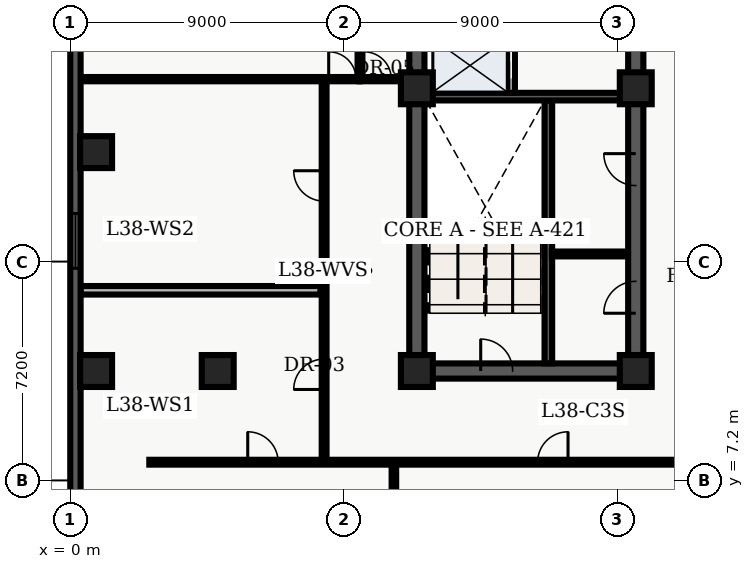
"""IFC4 building model, lengths in metres.
Left out: names, types, materials, properties, quantities, classifications, styles, units other than length and angle.
Written with IfcOpenShell. Run it as: python <this file> out.ifc"""

import sys

from ifc_helpers import new_model, entity, si_unit, converted_unit, direction, frame, origin_with_axes, origin_2d_with_axis, place, context, subcontext, project, spatial, polyline, rectangle, outline, extrude, element, fill, save


model = new_model("IFC4")
c1 = context("Model", 3, precision=1e-05, world=origin_with_axes(), true_north=direction((0.0, 1.0)))
c2 = subcontext(c1, "Body", "Model", "MODEL_VIEW")
j1 = project(units=[si_unit("LENGTHUNIT", "METRE"), converted_unit("PLANEANGLEUNIT", "DEGREE", entity("IfcPlaneAngleMeasure", 0.017), si_unit("PLANEANGLEUNIT", "RADIAN"), dimensions=[0, 0, 0, 0, 0, 0, 0])], contexts=[c1])
p1 = place(None, origin_with_axes())
s1 = spatial("IfcSite", under=j1, at=p1, CompositionType="ELEMENT")
p2 = place(p1, origin_with_axes())
s2 = spatial("IfcBuilding", under=s1, at=p2, CompositionType="ELEMENT")
p3 = place(p2, frame((0.0, 0.0, 156.3), z_axis=(0.0, 0.0, 1.0), x_axis=(1.0, 0.0, 0.0)))
s3 = spatial("IfcBuildingStorey", under=s2, at=p3, CompositionType="ELEMENT", Elevation=156.3)
p4 = place(p3, frame((11.4, 10.8, 0.0), z_axis=(0.0, 0.0, 1.0), x_axis=(0.0, 1.0, 0.0)))
e1 = element("IfcWall", 1, at=p4, inside=s3, PredefinedType="SHEAR", context=c2, shape_type="SweptSolid", body=[
    extrude(outline(polyline([(0.0, -0.25), (27.0, -0.25), (27.0, 0.25), (0.0, 0.25), (0.0, -0.25)])), origin_with_axes(), (0.0, 0.0, 1.0), 3.66),
])
p5 = place(p3, frame((11.4, 10.8, 0.0), z_axis=(0.0, 0.0, 1.0), x_axis=(1.0, 0.0, 0.0)))
e2 = element("IfcWall", 2, at=p5, inside=s3, PredefinedType="SHEAR", context=c2, shape_type="SweptSolid", body=[
    extrude(outline(polyline([(0.0, -0.25), (7.2, -0.25), (7.2, 0.25), (0.0, 0.25), (0.0, -0.25)])), origin_with_axes(), (0.0, 0.0, 1.0), 3.66),
])
p6 = place(p5, frame((2.625, 0.0, 0.0), z_axis=(0.0, 0.0, 1.0), x_axis=(1.0, 0.0, 0.0)))
e3 = element("IfcOpeningElement", 3, at=p6, cuts=e2, PredefinedType="OPENING", context=c2, shape_type="SweptSolid", body=[
    extrude(rectangle(XDim=1.05, YDim=0.52, at=origin_2d_with_axis()), origin_with_axes(), (0.0, 0.0, 1.0), 2.15),
])
p7 = place(p3, frame((18.6, 10.8, 0.0), z_axis=(0.0, 0.0, 1.0), x_axis=(0.0, 1.0, 0.0)))
e4 = element("IfcWall", 4, at=p7, inside=s3, PredefinedType="SHEAR", context=c2, shape_type="SweptSolid", body=[
    extrude(outline(polyline([(0.0, -0.25), (13.5, -0.25), (13.5, 0.25), (0.0, 0.25), (0.0, -0.25)])), origin_with_axes(), (0.0, 0.0, 1.0), 3.66),
])
p8 = place(p7, frame((11.125, 0.0, 0.0), z_axis=(0.0, 0.0, 1.0), x_axis=(1.0, 0.0, 0.0)))
e5 = element("IfcOpeningElement", 5, at=p8, cuts=e4, PredefinedType="OPENING", context=c2, shape_type="SweptSolid", body=[
    extrude(rectangle(XDim=1.05, YDim=0.52, at=origin_2d_with_axis()), origin_with_axes(), (0.0, 0.0, 1.0), 2.15),
])
p9 = place(p7, frame((2.425, 0.0, 0.0), z_axis=(0.0, 0.0, 1.0), x_axis=(1.0, 0.0, 0.0)))
e6 = element("IfcOpeningElement", 6, at=p9, cuts=e4, PredefinedType="OPENING", context=c2, shape_type="SweptSolid", body=[
    extrude(rectangle(XDim=1.05, YDim=0.52, at=origin_2d_with_axis()), origin_with_axes(), (0.0, 0.0, 1.0), 2.15),
])
p10 = place(p7, frame((6.625, 0.0, 0.0), z_axis=(0.0, 0.0, 1.0), x_axis=(1.0, 0.0, 0.0)))
e7 = element("IfcOpeningElement", 7, at=p10, cuts=e4, PredefinedType="OPENING", context=c2, shape_type="SweptSolid", body=[
    extrude(rectangle(XDim=1.05, YDim=0.52, at=origin_2d_with_axis()), origin_with_axes(), (0.0, 0.0, 1.0), 2.15),
])
p11 = place(p3, frame((15.725, 11.05, 0.0), z_axis=(0.0, 0.0, 1.0), x_axis=(0.0, 1.0, 0.0)))
e8 = element("IfcWall", 8, at=p11, inside=s3, PredefinedType="SHEAR", context=c2, shape_type="SweptSolid", body=[
    extrude(outline(polyline([(0.0, -0.125), (8.65, -0.125), (8.65, 0.125), (0.0, 0.125), (0.0, -0.125)])), origin_with_axes(), (0.0, 0.0, 1.0), 3.66),
])
p12 = place(p3, frame((11.65, 19.825, 0.0), z_axis=(0.0, 0.0, 1.0), x_axis=(1.0, 0.0, 0.0)))
e9 = element("IfcWall", 9, at=p12, inside=s3, PredefinedType="SHEAR", context=c2, shape_type="SweptSolid", body=[
    extrude(outline(polyline([(0.0, -0.125), (6.7, -0.125), (6.7, 0.125), (0.0, 0.125), (0.0, -0.125)])), origin_with_axes(), (0.0, 0.0, 1.0), 3.66),
])
p13 = place(p3, frame((14.5, 19.95, 0.0), z_axis=(0.0, 0.0, 1.0), x_axis=(0.0, 1.0, 0.0)))
e10 = element("IfcWall", 10, at=p13, inside=s3, PredefinedType="SOLIDWALL", context=c2, shape_type="SweptSolid", body=[
    extrude(outline(polyline([(0.0, -0.125), (6.25, -0.125), (6.25, 0.125), (0.0, 0.125), (0.0, -0.125)])), origin_with_axes(), (0.0, 0.0, 1.0), 2.7),
])
p14 = place(p13, frame((1.025, 0.0, 0.0), z_axis=(0.0, 0.0, 1.0), x_axis=(1.0, 0.0, 0.0)))
e11 = element("IfcOpeningElement", 11, at=p14, cuts=e10, PredefinedType="OPENING", context=c2, shape_type="SweptSolid", body=[
    extrude(rectangle(XDim=1.1, YDim=0.27, at=origin_2d_with_axis()), origin_with_axes(), (0.0, 0.0, 1.0), 2.15),
])
p15 = place(p13, frame((2.975, 0.0, 0.0), z_axis=(0.0, 0.0, 1.0), x_axis=(1.0, 0.0, 0.0)))
e12 = element("IfcOpeningElement", 12, at=p15, cuts=e10, PredefinedType="OPENING", context=c2, shape_type="SweptSolid", body=[
    extrude(rectangle(XDim=1.1, YDim=0.27, at=origin_2d_with_axis()), origin_with_axes(), (0.0, 0.0, 1.0), 2.15),
])
p16 = place(p13, frame((5.425, 0.0, 0.0), z_axis=(0.0, 0.0, 1.0), x_axis=(1.0, 0.0, 0.0)))
e13 = element("IfcOpeningElement", 13, at=p16, cuts=e10, PredefinedType="OPENING", context=c2, shape_type="SweptSolid", body=[
    extrude(rectangle(XDim=1.2, YDim=0.27, at=origin_2d_with_axis()), origin_with_axes(), (0.0, 0.0, 1.0), 2.15),
])
for number, where, z_axis, x_axis in (
    (14, (11.4, 10.8, 0.0), (0.0, 0.0, 1.0), (1.0, 0.0, 0.0)),
    (15, (11.4, 20.1, 0.0), (0.0, 0.0, 1.0), (1.0, 0.0, 0.0)),
    (16, (18.6, 10.8, 0.0), (0.0, 0.0, 1.0), (1.0, 0.0, 0.0)),
    (17, (18.6, 20.1, 0.0), (0.0, 0.0, 1.0), (1.0, 0.0, 0.0)),
    (18, (4.85, 10.8, 0.0), (0.0, 0.0, 1.0), (1.0, 0.0, 0.0)),
    (19, (0.85, 10.8, 0.0), (0.0, 0.0, 1.0), (1.0, 0.0, 0.0)),
    (20, (0.85, 18.0, 0.0), (0.0, 0.0, 1.0), (1.0, 0.0, 0.0)),
):
    element("IfcColumn", number, at=place(p3, frame(where, z_axis=z_axis, x_axis=x_axis)), inside=s3, PredefinedType="COLUMN", context=c2, shape_type="SweptSolid", body=[
        extrude(rectangle(XDim=1.05, YDim=1.05, at=origin_2d_with_axis()), origin_with_axes(), (0.0, 0.0, 1.0), 3.9),
    ])
p17 = place(p3, frame((15.84, 14.65, 0.0), z_axis=(0.0, 0.0, 1.0), x_axis=(1.0, 0.0, 0.0)))
e21 = element("IfcWall", 21, at=p17, inside=s3, PredefinedType="PARTITIONING", context=c2, shape_type="SweptSolid", body=[
    extrude(outline(polyline([(0.0, -0.08), (2.46, -0.08), (2.46, 0.08), (0.0, 0.08), (0.0, -0.08)])), origin_with_axes(), (0.0, 0.0, 1.0), 2.7),
])
p18 = place(p3, frame((9.52, 20.4, 0.0), z_axis=(0.0, 0.0, 1.0), x_axis=(0.0, 1.0, 0.0)))
e22 = element("IfcWall", 22, at=p18, inside=s3, PredefinedType="PARTITIONING", context=c2, shape_type="SweptSolid", body=[
    extrude(outline(polyline([(0.0, -0.07), (4.0, -0.07), (4.0, 0.07), (0.0, 0.07), (0.0, -0.07)])), origin_with_axes(), (0.0, 0.0, 1.0), 2.7),
])
p19 = place(p3, frame((9.52, 20.4, 0.0), z_axis=(0.0, 0.0, 1.0), x_axis=(1.0, 0.0, 0.0)))
e23 = element("IfcWall", 23, at=p19, inside=s3, PredefinedType="PARTITIONING", context=c2, shape_type="SweptSolid", body=[
    extrude(outline(polyline([(0.0, -0.07), (1.58, -0.07), (1.58, 0.07), (0.0, 0.07), (0.0, -0.07)])), origin_with_axes(), (0.0, 0.0, 1.0), 2.7),
])
p20 = place(p19, frame((0.59, 0.0, 0.0), z_axis=(0.0, 0.0, 1.0), x_axis=(1.0, 0.0, 0.0)))
e24 = element("IfcOpeningElement", 24, at=p20, cuts=e23, PredefinedType="OPENING", context=c2, shape_type="SweptSolid", body=[
    extrude(rectangle(XDim=0.9, YDim=0.16, at=origin_2d_with_axis()), origin_with_axes(), (0.0, 0.0, 1.0), 2.15),
])
p21 = place(p3, frame((2.6, 7.8, 0.0), z_axis=(0.0, 0.0, 1.0), x_axis=(1.0, 0.0, 0.0)))
e25 = element("IfcWall", 25, at=p21, inside=s3, PredefinedType="PARTITIONING", context=c2, shape_type="SweptSolid", body=[
    extrude(outline(polyline([(0.0, -0.08), (18.55, -0.08), (18.55, 0.08), (0.0, 0.08), (0.0, -0.08)])), origin_with_axes(), (0.0, 0.0, 1.0), 2.7),
])
p22 = place(p21, frame((3.737, 0.0, 0.0), z_axis=(0.0, 0.0, 1.0), x_axis=(1.0, 0.0, 0.0)))
e26 = element("IfcOpeningElement", 26, at=p22, cuts=e25, PredefinedType="OPENING", context=c2, shape_type="SweptSolid", body=[
    extrude(rectangle(XDim=1.0, YDim=0.18, at=origin_2d_with_axis()), origin_with_axes(), (0.0, 0.0, 1.0), 2.15),
])
p23 = place(p21, frame((13.273, 0.0, 0.0), z_axis=(0.0, 0.0, 1.0), x_axis=(1.0, 0.0, 0.0)))
e27 = element("IfcOpeningElement", 27, at=p23, cuts=e25, PredefinedType="OPENING", context=c2, shape_type="SweptSolid", body=[
    extrude(rectangle(XDim=1.0, YDim=0.18, at=origin_2d_with_axis()), origin_with_axes(), (0.0, 0.0, 1.0), 2.15),
])
p24 = place(p3, frame((8.35, 7.8, 0.0), z_axis=(0.0, 0.0, 1.0), x_axis=(0.0, 1.0, 0.0)))
e28 = element("IfcWall", 28, at=p24, inside=s3, PredefinedType="PARTITIONING", context=c2, shape_type="SweptSolid", body=[
    extrude(outline(polyline([(0.0, -0.08), (12.6, -0.08), (12.6, 0.08), (0.0, 0.08), (0.0, -0.08)])), origin_with_axes(), (0.0, 0.0, 1.0), 2.7),
])
p25 = place(p24, frame((2.893, 0.0, 0.0), z_axis=(0.0, 0.0, 1.0), x_axis=(1.0, 0.0, 0.0)))
e29 = element("IfcOpeningElement", 29, at=p25, cuts=e28, PredefinedType="OPENING", context=c2, shape_type="SweptSolid", body=[
    extrude(rectangle(XDim=1.0, YDim=0.18, at=origin_2d_with_axis()), origin_with_axes(), (0.0, 0.0, 1.0), 2.15),
])
p26 = place(p24, frame((9.088, 0.0, 0.0), z_axis=(0.0, 0.0, 1.0), x_axis=(1.0, 0.0, 0.0)))
e30 = element("IfcOpeningElement", 30, at=p26, cuts=e28, PredefinedType="OPENING", context=c2, shape_type="SweptSolid", body=[
    extrude(rectangle(XDim=1.0, YDim=0.18, at=origin_2d_with_axis()), origin_with_axes(), (0.0, 0.0, 1.0), 2.15),
])
p27 = place(p3, frame((0.335, 20.4, 0.0), z_axis=(0.0, 0.0, 1.0), x_axis=(1.0, 0.0, 0.0)))
e31 = element("IfcWall", 31, at=p27, inside=s3, PredefinedType="PARTITIONING", context=c2, shape_type="SweptSolid", body=[
    extrude(outline(polyline([(0.0, -0.07), (9.185, -0.07), (9.185, 0.07), (0.0, 0.07), (0.0, -0.07)])), origin_with_axes(), (0.0, 0.0, 1.0), 2.7),
])
p28 = place(p27, frame((8.615, 0.0, 0.0), z_axis=(0.0, 0.0, 1.0), x_axis=(1.0, 0.0, 0.0)))
e32 = element("IfcOpeningElement", 32, at=p28, cuts=e31, PredefinedType="OPENING", context=c2, shape_type="SweptSolid", body=[
    extrude(rectangle(XDim=0.9, YDim=0.16, at=origin_2d_with_axis()), origin_with_axes(), (0.0, 0.0, 1.0), 2.15),
])
p29 = place(p3, frame((0.335, 13.455, 0.0), z_axis=(0.0, 0.0, 1.0), x_axis=(1.0, 0.0, 0.0)))
e33 = element("IfcWall", 33, at=p29, inside=s3, PredefinedType="PARTITIONING", context=c2, shape_type="SweptSolid", body=[
    extrude(outline(polyline([(0.0, -0.14), (7.895, -0.14), (7.895, 0.14), (0.0, 0.14), (0.0, -0.14)])), origin_with_axes(), (0.0, 0.0, 1.0), 2.7),
])
p30 = place(p3, frame((10.645, 0.335, 0.0), z_axis=(0.0, 0.0, 1.0), x_axis=(0.0, 1.0, 0.0)))
e34 = element("IfcWall", 34, at=p30, inside=s3, PredefinedType="PARTITIONING", context=c2, shape_type="SweptSolid", body=[
    extrude(outline(polyline([(0.0, -0.075), (7.365, -0.075), (7.365, 0.075), (0.0, 0.075), (0.0, -0.075)])), origin_with_axes(), (0.0, 0.0, 1.0), 2.7),
])
p31 = place(p3, frame((0.17, 2.74, 0.0), z_axis=(0.0, 0.0, 1.0), x_axis=(0.0, 1.0, 0.0)))
e35 = element("IfcWall", 35, at=p31, inside=s3, PredefinedType="SOLIDWALL", context=c2, shape_type="SweptSolid", body=[
    extrude(outline(polyline([(0.0, -0.17), (43.46, -0.17), (43.46, 0.17), (0.0, 0.17), (0.0, -0.17)])), origin_with_axes(), (0.0, 0.0, 1.0), 3.66),
])
p32 = place(p31, frame((2.948, 0.0, 0.45), z_axis=(0.0, 0.0, 1.0), x_axis=(1.0, 0.0, 0.0)))
e36 = element("IfcOpeningElement", 36, at=p32, cuts=e35, PredefinedType="OPENING", context=c2, shape_type="SweptSolid", body=[
    extrude(rectangle(XDim=1.8, YDim=0.36, at=origin_2d_with_axis()), origin_with_axes(), (0.0, 0.0, 1.0), 2.1),
])
p33 = place(p31, frame((12.339, 0.0, 0.45), z_axis=(0.0, 0.0, 1.0), x_axis=(1.0, 0.0, 0.0)))
e37 = element("IfcOpeningElement", 37, at=p33, cuts=e35, PredefinedType="OPENING", context=c2, shape_type="SweptSolid", body=[
    extrude(rectangle(XDim=1.8, YDim=0.36, at=origin_2d_with_axis()), origin_with_axes(), (0.0, 0.0, 1.0), 2.1),
])
p34 = place(p31, frame((26.426, 0.0, 0.45), z_axis=(0.0, 0.0, 1.0), x_axis=(1.0, 0.0, 0.0)))
e38 = element("IfcOpeningElement", 38, at=p34, cuts=e35, PredefinedType="OPENING", context=c2, shape_type="SweptSolid", body=[
    extrude(rectangle(XDim=1.8, YDim=0.36, at=origin_2d_with_axis()), origin_with_axes(), (0.0, 0.0, 1.0), 2.1),
])
p35 = place(p31, frame((31.121, 0.0, 0.45), z_axis=(0.0, 0.0, 1.0), x_axis=(1.0, 0.0, 0.0)))
e39 = element("IfcOpeningElement", 39, at=p35, cuts=e35, PredefinedType="OPENING", context=c2, shape_type="SweptSolid", body=[
    extrude(rectangle(XDim=1.8, YDim=0.36, at=origin_2d_with_axis()), origin_with_axes(), (0.0, 0.0, 1.0), 2.1),
])
p36 = place(p31, frame((40.062, 0.0, 0.45), z_axis=(0.0, 0.0, 1.0), x_axis=(1.0, 0.0, 0.0)))
e40 = element("IfcOpeningElement", 40, at=p36, cuts=e35, PredefinedType="OPENING", context=c2, shape_type="SweptSolid", body=[
    extrude(rectangle(XDim=1.8, YDim=0.36, at=origin_2d_with_axis()), origin_with_axes(), (0.0, 0.0, 1.0), 2.1),
])
p37 = place(p13, frame((1.025, 0.0, 0.0), z_axis=(0.0, 0.0, 1.0), x_axis=(1.0, 0.0, 0.0)))
e41 = element("IfcDoor", 41, at=p37, inside=s3, OperationType="SLIDING_TO_LEFT", PredefinedType="DOOR", context=c2, shape_type="SweptSolid", body=[
    extrude(rectangle(XDim=1.1, YDim=0.09, at=origin_2d_with_axis()), origin_with_axes(), (0.0, 0.0, 1.0), 2.15),
])
fill(e11, e41)
p38 = place(p5, frame((2.625, 0.0, 0.0), z_axis=(0.0, 0.0, 1.0), x_axis=(1.0, 0.0, 0.0)))
e42 = element("IfcDoor", 42, at=p38, inside=s3, OperationType="SINGLE_SWING_LEFT", PredefinedType="DOOR", context=c2, shape_type="SweptSolid", body=[
    extrude(rectangle(XDim=1.05, YDim=0.09, at=origin_2d_with_axis()), origin_with_axes(), (0.0, 0.0, 1.0), 2.15),
])
fill(e3, e42)
p39 = place(p7, frame((2.425, 0.0, 0.0), z_axis=(0.0, 0.0, 1.0), x_axis=(1.0, 0.0, 0.0)))
e43 = element("IfcDoor", 43, at=p39, inside=s3, OperationType="SINGLE_SWING_LEFT", PredefinedType="DOOR", context=c2, shape_type="SweptSolid", body=[
    extrude(rectangle(XDim=1.05, YDim=0.09, at=origin_2d_with_axis()), origin_with_axes(), (0.0, 0.0, 1.0), 2.15),
])
fill(e6, e43)
p40 = place(p7, frame((6.625, 0.0, 0.0), z_axis=(0.0, 0.0, 1.0), x_axis=(1.0, 0.0, 0.0)))
e44 = element("IfcDoor", 44, at=p40, inside=s3, OperationType="SINGLE_SWING_RIGHT", PredefinedType="DOOR", context=c2, shape_type="SweptSolid", body=[
    extrude(rectangle(XDim=1.05, YDim=0.09, at=origin_2d_with_axis()), origin_with_axes(), (0.0, 0.0, 1.0), 2.15),
])
fill(e7, e44)
p41 = place(p19, frame((0.59, 0.0, 0.0), z_axis=(0.0, 0.0, 1.0), x_axis=(1.0, 0.0, 0.0)))
e45 = element("IfcDoor", 45, at=p41, inside=s3, OperationType="SINGLE_SWING_LEFT", PredefinedType="DOOR", context=c2, shape_type="SweptSolid", body=[
    extrude(rectangle(XDim=0.9, YDim=0.084, at=origin_2d_with_axis()), origin_with_axes(), (0.0, 0.0, 1.0), 2.15),
])
fill(e24, e45)
p42 = place(p27, frame((8.615, 0.0, 0.0), z_axis=(0.0, 0.0, 1.0), x_axis=(1.0, 0.0, 0.0)))
e46 = element("IfcDoor", 46, at=p42, inside=s3, OperationType="SINGLE_SWING_LEFT", PredefinedType="DOOR", context=c2, shape_type="SweptSolid", body=[
    extrude(rectangle(XDim=0.9, YDim=0.084, at=origin_2d_with_axis()), origin_with_axes(), (0.0, 0.0, 1.0), 2.15),
])
fill(e32, e46)
p43 = place(p24, frame((2.893, 0.0, 0.0), z_axis=(0.0, 0.0, 1.0), x_axis=(1.0, 0.0, 0.0)))
e47 = element("IfcDoor", 47, at=p43, inside=s3, OperationType="SINGLE_SWING_LEFT", PredefinedType="DOOR", context=c2, shape_type="SweptSolid", body=[
    extrude(rectangle(XDim=1.0, YDim=0.09, at=origin_2d_with_axis()), origin_with_axes(), (0.0, 0.0, 1.0), 2.15),
])
fill(e29, e47)
p44 = place(p24, frame((9.088, 0.0, 0.0), z_axis=(0.0, 0.0, 1.0), x_axis=(1.0, 0.0, 0.0)))
e48 = element("IfcDoor", 48, at=p44, inside=s3, OperationType="SINGLE_SWING_RIGHT", PredefinedType="DOOR", context=c2, shape_type="SweptSolid", body=[
    extrude(rectangle(XDim=1.0, YDim=0.09, at=origin_2d_with_axis()), origin_with_axes(), (0.0, 0.0, 1.0), 2.15),
])
fill(e30, e48)
p45 = place(p21, frame((3.737, 0.0, 0.0), z_axis=(0.0, 0.0, 1.0), x_axis=(1.0, 0.0, 0.0)))
e49 = element("IfcDoor", 49, at=p45, inside=s3, OperationType="SINGLE_SWING_LEFT", PredefinedType="DOOR", context=c2, shape_type="SweptSolid", body=[
    extrude(rectangle(XDim=1.0, YDim=0.09, at=origin_2d_with_axis()), origin_with_axes(), (0.0, 0.0, 1.0), 2.15),
])
fill(e26, e49)
p46 = place(p21, frame((13.273, 0.0, 0.0), z_axis=(0.0, 0.0, 1.0), x_axis=(1.0, 0.0, 0.0)))
e50 = element("IfcDoor", 50, at=p46, inside=s3, OperationType="SINGLE_SWING_RIGHT", PredefinedType="DOOR", context=c2, shape_type="SweptSolid", body=[
    extrude(rectangle(XDim=1.0, YDim=0.09, at=origin_2d_with_axis()), origin_with_axes(), (0.0, 0.0, 1.0), 2.15),
])
fill(e27, e50)
p47 = place(p31, frame((12.339, 0.0, 0.45), z_axis=(0.0, 0.0, 1.0), x_axis=(1.0, 0.0, 0.0)))
e51 = element("IfcWindow", 51, at=p47, inside=s3, PredefinedType="WINDOW", context=c2, shape_type="SweptSolid", body=[
    extrude(rectangle(XDim=1.8, YDim=0.09, at=origin_2d_with_axis()), origin_with_axes(), (0.0, 0.0, 1.0), 2.1),
])
fill(e37, e51)
save(model, sys.argv[1])
